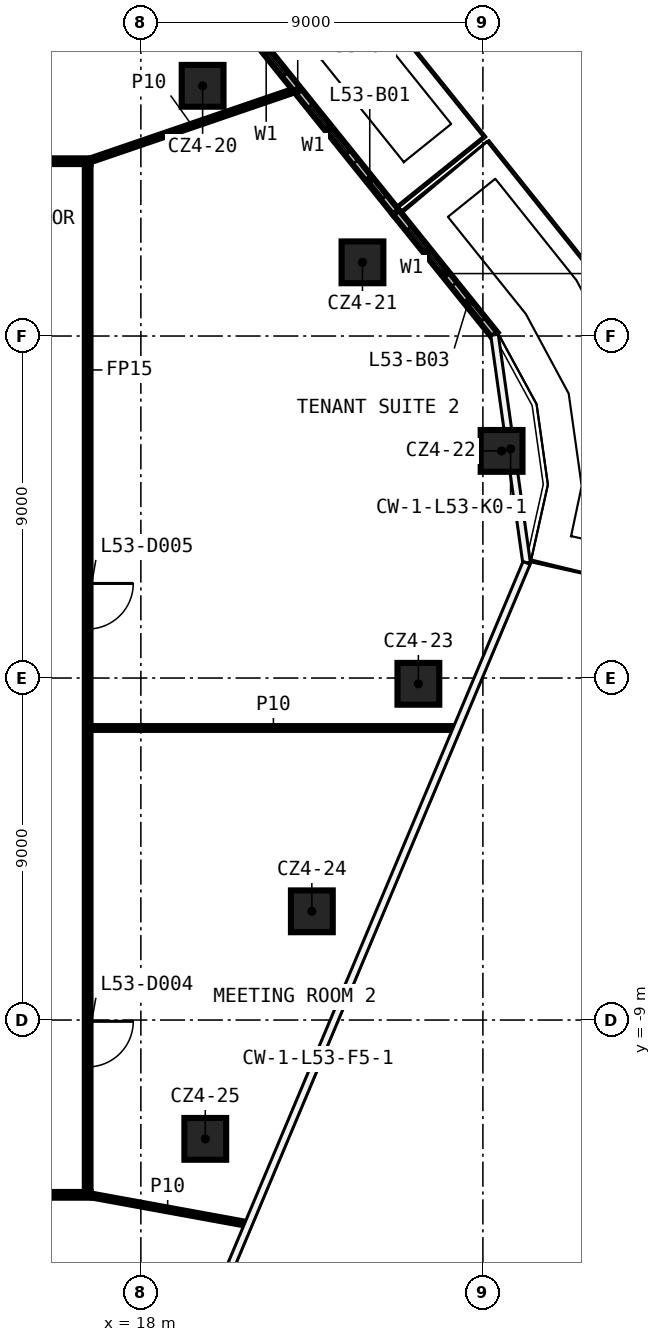
"""IFC4 building model, lengths in metres.
Left out: names, types, materials, properties, quantities, classifications, styles, units other than length and angle.
Written with IfcOpenShell. Run it as: python <this file> out.ifc"""

import sys

from ifc_helpers import new_model, si_unit, direction, frame, frame_2d, origin, origin_2d, place, context, subcontext, project, spatial, rectangle, extrude, element, fill, save


model = new_model("IFC4")
c1 = context("Model", 3, precision=1e-05, world=origin(), true_north=direction((0.0, 1.0)))
c2 = subcontext(c1, "Body", "Model", "MODEL_VIEW")
j1 = project(units=[si_unit("LENGTHUNIT", "METRE"), si_unit("PLANEANGLEUNIT", "RADIAN")], contexts=[c1])
p1 = place(None, origin())
s1 = spatial("IfcSite", under=j1, at=p1, CompositionType="ELEMENT")
p2 = place(p1, origin())
s2 = spatial("IfcBuilding", under=s1, at=p2, CompositionType="ELEMENT")
p3 = place(p2, frame((0.0, 0.0, 253.8)))
s3 = spatial("IfcBuildingStorey", under=s2, at=p3, CompositionType="ELEMENT", Elevation=253.8)
for number, where, z_axis, x_axis in (
    (1, (19.625, 15.584, 0.0), (0.0, 0.0, 1.0), (1.0, 0.0, 0.0)),
    (2, (23.831, 10.939, 0.0), (0.0, 0.0, 1.0), (1.0, 0.0, 0.0)),
    (3, (27.492, 5.977, 0.0), (0.0, 0.0, 1.0), (1.0, 0.0, 0.0)),
    (4, (25.302, -0.152, 0.0), (0.0, 0.0, 1.0), (1.0, 0.0, 0.0)),
    (5, (22.499, -6.139, 0.0), (0.0, 0.0, 1.0), (1.0, 0.0, 0.0)),
    (6, (19.695, -12.127, 0.0), (0.0, 0.0, 1.0), (1.0, 0.0, 0.0)),
):
    element("IfcColumn", number, at=place(p3, frame(where, z_axis=z_axis, x_axis=x_axis)), inside=s3, PredefinedType="COLUMN", context=c2, shape_type="SweptSolid", body=[
        extrude(rectangle(XDim=1.1, YDim=1.1, at=origin_2d()), origin(), (0.0, 0.0, 1.0), 3.82),
    ])
p4 = place(p3, frame((16.675, -13.6, 0.0), z_axis=(0.0, 0.0, 1.0), x_axis=(-1.0, 0.0, 0.0)))
e7 = element("IfcWall", 7, at=p4, inside=s3, PredefinedType="PARTITIONING", context=c2, shape_type="SweptSolid", body=[
    extrude(rectangle(XDim=32.75, YDim=0.15, at=frame_2d((16.375, 0.0))), origin(), (0.0, 0.0, 1.0), 3.82),
])
p5 = place(p4, frame((29.587, 0.0, 0.0)))
e8 = element("IfcOpeningElement", 8, at=p5, cuts=e7, PredefinedType="OPENING", context=c2, shape_type="SweptSolid", body=[
    extrude(rectangle(XDim=1.2, YDim=2.1, at=frame_2d((0.6, 1.05))), frame((0.0, 0.085, 0.0), z_axis=(0.0, -1.0, 0.0), x_axis=(1.0, 0.0, 0.0)), (0.0, 0.0, 1.0), 0.17),
])
p6 = place(p4, frame((17.04, 0.0, 0.0)))
e9 = element("IfcOpeningElement", 9, at=p6, cuts=e7, PredefinedType="OPENING", context=c2, shape_type="SweptSolid", body=[
    extrude(rectangle(XDim=1.2, YDim=2.1, at=frame_2d((0.6, 1.05))), frame((0.0, 0.085, 0.0), z_axis=(0.0, -1.0, 0.0), x_axis=(1.0, 0.0, 0.0)), (0.0, 0.0, 1.0), 0.17),
])
p7 = place(p4, frame((2.495, 0.0, 0.0)))
e10 = element("IfcOpeningElement", 10, at=p7, cuts=e7, PredefinedType="OPENING", context=c2, shape_type="SweptSolid", body=[
    extrude(rectangle(XDim=1.2, YDim=2.1, at=frame_2d((0.6, 1.05))), frame((0.0, 0.085, 0.0), z_axis=(0.0, -1.0, 0.0), x_axis=(1.0, 0.0, 0.0)), (0.0, 0.0, 1.0), 0.17),
])
p8 = place(p3, frame((16.675, -1.315, 0.0), z_axis=(0.0, 0.0, 1.0), x_axis=(1.0, 0.0, 0.0)))
e11 = element("IfcWall", 11, at=p8, inside=s3, PredefinedType="PARTITIONING", context=c2, shape_type="SweptSolid", body=[
    extrude(rectangle(XDim=9.626, YDim=0.1, at=frame_2d((4.813, 0.0))), origin(), (0.0, 0.0, 1.0), 3.82),
])
p9 = place(p3, frame((-16.075, 13.6, 0.0), z_axis=(0.0, 0.0, 1.0), x_axis=(1.0, 0.0, 0.0)))
e12 = element("IfcWall", 12, at=p9, inside=s3, PredefinedType="PARTITIONING", context=c2, shape_type="SweptSolid", body=[
    extrude(rectangle(XDim=32.75, YDim=0.15, at=frame_2d((16.375, 0.0))), origin(), (0.0, 0.0, 1.0), 3.82),
])
p10 = place(p9, frame((16.43, 0.0, 0.0)))
e13 = element("IfcOpeningElement", 13, at=p10, cuts=e12, PredefinedType="OPENING", context=c2, shape_type="SweptSolid", body=[
    extrude(rectangle(XDim=1.2, YDim=2.1, at=frame_2d((0.6, 1.05))), frame((0.0, 0.085, 0.0), z_axis=(0.0, -1.0, 0.0), x_axis=(1.0, 0.0, 0.0)), (0.0, 0.0, 1.0), 0.17),
])
p11 = place(p9, frame((4.465, 0.0, 0.0)))
e14 = element("IfcOpeningElement", 14, at=p11, cuts=e12, PredefinedType="OPENING", context=c2, shape_type="SweptSolid", body=[
    extrude(rectangle(XDim=1.2, YDim=2.1, at=frame_2d((0.6, 1.05))), frame((0.0, 0.085, 0.0), z_axis=(0.0, -1.0, 0.0), x_axis=(1.0, 0.0, 0.0)), (0.0, 0.0, 1.0), 0.17),
])
p12 = place(p3, frame((16.6, 13.6, 0.0), z_axis=(0.0, 0.0, 1.0), x_axis=(0.946142628781, 0.323750098073, 0.0)))
e15 = element("IfcWall", 15, at=p12, inside=s3, PredefinedType="PARTITIONING", context=c2, shape_type="SweptSolid", body=[
    extrude(rectangle(XDim=5.805, YDim=0.1, at=frame_2d((2.903, 0.0))), origin(), (0.0, 0.0, 1.0), 3.82),
])
p13 = place(p3, frame((16.6, 13.525, 0.0), z_axis=(0.0, 0.0, 1.0), x_axis=(0.0, -1.0, 0.0)))
e16 = element("IfcWall", 16, at=p13, inside=s3, PredefinedType="PARTITIONING", context=c2, shape_type="SweptSolid", body=[
    extrude(rectangle(XDim=27.05, YDim=0.15, at=frame_2d((13.525, 0.0))), origin(), (0.0, 0.0, 1.0), 3.82),
])
p14 = place(p13, frame((22.559, 0.0, 0.0)))
e17 = element("IfcOpeningElement", 17, at=p14, cuts=e16, PredefinedType="OPENING", context=c2, shape_type="SweptSolid", body=[
    extrude(rectangle(XDim=1.2, YDim=2.1, at=frame_2d((0.6, 1.05))), frame((0.0, 0.085, 0.0), z_axis=(0.0, -1.0, 0.0), x_axis=(1.0, 0.0, 0.0)), (0.0, 0.0, 1.0), 0.17),
])
p15 = place(p13, frame((11.036, 0.0, 0.0)))
e18 = element("IfcOpeningElement", 18, at=p15, cuts=e16, PredefinedType="OPENING", context=c2, shape_type="SweptSolid", body=[
    extrude(rectangle(XDim=1.2, YDim=2.1, at=frame_2d((0.6, 1.05))), frame((0.0, 0.085, 0.0), z_axis=(0.0, -1.0, 0.0), x_axis=(1.0, 0.0, 0.0)), (0.0, 0.0, 1.0), 0.17),
])
p16 = place(p3, frame((16.6, -13.6, 0.0), z_axis=(0.0, 0.0, 1.0), x_axis=(0.983699688502, -0.179819139254, 0.0)))
e19 = element("IfcWall", 19, at=p16, inside=s3, PredefinedType="PARTITIONING", context=c2, shape_type="SweptSolid", body=[
    extrude(rectangle(XDim=4.28, YDim=0.1, at=frame_2d((2.14, 0.0))), origin(), (0.0, 0.0, 1.0), 3.82),
])
p17 = place(p3, frame((24.712, 12.255, 0.0), z_axis=(0.0, 0.0, 1.0), x_axis=(-0.626871708653, 0.77912249415, 0.0)))
e20 = element("IfcWall", 20, at=p17, inside=s3, PredefinedType="SOLIDWALL", context=c2, shape_type="SweptSolid", body=[
    extrude(rectangle(XDim=8.293, YDim=0.2, at=frame_2d((4.147, 0.0))), origin(), (0.0, 0.0, 1.0), 3.82),
])
p18 = place(p17, frame((2.0, 0.0, 0.6)))
e21 = element("IfcOpeningElement", 21, at=p18, cuts=e20, PredefinedType="OPENING", context=c2, shape_type="SweptSolid", body=[
    extrude(rectangle(XDim=1.6, YDim=2.4, at=frame_2d((0.8, 1.2))), frame((0.0, 0.11, 0.0), z_axis=(0.0, -1.0, 0.0), x_axis=(1.0, 0.0, 0.0)), (0.0, 0.0, 1.0), 0.22),
])
p19 = place(p17, frame((0.5, 0.0, 0.0)))
e22 = element("IfcOpeningElement", 22, at=p19, cuts=e20, PredefinedType="OPENING", context=c2, shape_type="SweptSolid", body=[
    extrude(rectangle(XDim=1.2, YDim=2.4, at=frame_2d((0.6, 1.2))), frame((0.0, 0.11, 0.0), z_axis=(0.0, -1.0, 0.0), x_axis=(1.0, 0.0, 0.0)), (0.0, 0.0, 1.0), 0.22),
])
p20 = place(p17, frame((4.647, 0.0, 0.6)))
e23 = element("IfcOpeningElement", 23, at=p20, cuts=e20, PredefinedType="OPENING", context=c2, shape_type="SweptSolid", body=[
    extrude(rectangle(XDim=1.6, YDim=2.4, at=frame_2d((0.8, 1.2))), frame((0.0, 0.11, 0.0), z_axis=(0.0, -1.0, 0.0), x_axis=(1.0, 0.0, 0.0)), (0.0, 0.0, 1.0), 0.22),
])
p21 = place(p17, frame((6.547, 0.0, 0.0)))
e24 = element("IfcOpeningElement", 24, at=p21, cuts=e20, PredefinedType="OPENING", context=c2, shape_type="SweptSolid", body=[
    extrude(rectangle(XDim=1.2, YDim=2.4, at=frame_2d((0.6, 1.2))), frame((0.0, 0.11, 0.0), z_axis=(0.0, -1.0, 0.0), x_axis=(1.0, 0.0, 0.0)), (0.0, 0.0, 1.0), 0.22),
])
p22 = place(p3, frame((27.306, 9.031, 0.0), z_axis=(0.0, 0.0, 1.0), x_axis=(-0.626851318776, 0.779138899137, 0.0)))
e25 = element("IfcWall", 25, at=p22, inside=s3, PredefinedType="SOLIDWALL", context=c2, shape_type="SweptSolid", body=[
    extrude(rectangle(XDim=4.138, YDim=0.2, at=frame_2d((2.069, 0.0))), origin(), (0.0, 0.0, 1.0), 3.82),
])
p23 = place(p22, frame((2.0, 0.0, 0.6)))
e26 = element("IfcOpeningElement", 26, at=p23, cuts=e25, PredefinedType="OPENING", context=c2, shape_type="SweptSolid", body=[
    extrude(rectangle(XDim=1.6, YDim=2.4, at=frame_2d((0.8, 1.2))), frame((0.0, 0.11, 0.0), z_axis=(0.0, -1.0, 0.0), x_axis=(1.0, 0.0, 0.0)), (0.0, 0.0, 1.0), 0.22),
])
p24 = place(p22, frame((0.5, 0.0, 0.0)))
e27 = element("IfcOpeningElement", 27, at=p24, cuts=e25, PredefinedType="OPENING", context=c2, shape_type="SweptSolid", body=[
    extrude(rectangle(XDim=1.2, YDim=2.4, at=frame_2d((0.6, 1.2))), frame((0.0, 0.11, 0.0), z_axis=(0.0, -1.0, 0.0), x_axis=(1.0, 0.0, 0.0)), (0.0, 0.0, 1.0), 0.22),
])
p25 = place(p14, origin())
e28 = element("IfcDoor", 28, at=p25, inside=s3, OperationType="SINGLE_SWING_LEFT", PredefinedType="DOOR", context=c2, shape_type="SweptSolid", body=[
    extrude(rectangle(XDim=1.2, YDim=2.1, at=frame_2d((0.6, 1.05))), frame((0.0, 0.025, 0.0), z_axis=(0.0, -1.0, 0.0), x_axis=(1.0, 0.0, 0.0)), (0.0, 0.0, 1.0), 0.05),
])
fill(e17, e28)
p26 = place(p15, origin())
e29 = element("IfcDoor", 29, at=p26, inside=s3, OperationType="SINGLE_SWING_RIGHT", PredefinedType="DOOR", context=c2, shape_type="SweptSolid", body=[
    extrude(rectangle(XDim=1.2, YDim=2.1, at=frame_2d((0.6, 1.05))), frame((0.0, 0.025, 0.0), z_axis=(0.0, -1.0, 0.0), x_axis=(1.0, 0.0, 0.0)), (0.0, 0.0, 1.0), 0.05),
])
fill(e18, e29)
p27 = place(p18, origin())
e30 = element("IfcWindow", 30, at=p27, inside=s3, PartitioningType="SINGLE_PANEL", PredefinedType="WINDOW", context=c2, shape_type="SweptSolid", body=[
    extrude(rectangle(XDim=1.6, YDim=2.4, at=frame_2d((0.8, 1.2))), frame((0.0, 0.03, 0.0), z_axis=(0.0, -1.0, 0.0), x_axis=(1.0, 0.0, 0.0)), (0.0, 0.0, 1.0), 0.06),
])
fill(e21, e30)
p28 = place(p19, origin())
e31 = element("IfcDoor", 31, at=p28, inside=s3, OperationType="SLIDING_TO_LEFT", PredefinedType="DOOR", context=c2, shape_type="SweptSolid", body=[
    extrude(rectangle(XDim=1.2, YDim=2.4, at=frame_2d((0.6, 1.2))), frame((0.0, 0.025, 0.0), z_axis=(0.0, -1.0, 0.0), x_axis=(1.0, 0.0, 0.0)), (0.0, 0.0, 1.0), 0.05),
])
fill(e22, e31)
p29 = place(p20, origin())
e32 = element("IfcWindow", 32, at=p29, inside=s3, PartitioningType="SINGLE_PANEL", PredefinedType="WINDOW", context=c2, shape_type="SweptSolid", body=[
    extrude(rectangle(XDim=1.6, YDim=2.4, at=frame_2d((0.8, 1.2))), frame((0.0, 0.03, 0.0), z_axis=(0.0, -1.0, 0.0), x_axis=(1.0, 0.0, 0.0)), (0.0, 0.0, 1.0), 0.06),
])
fill(e23, e32)
p30 = place(p23, origin())
e33 = element("IfcWindow", 33, at=p30, inside=s3, PartitioningType="SINGLE_PANEL", PredefinedType="WINDOW", context=c2, shape_type="SweptSolid", body=[
    extrude(rectangle(XDim=1.6, YDim=2.4, at=frame_2d((0.8, 1.2))), frame((0.0, 0.03, 0.0), z_axis=(0.0, -1.0, 0.0), x_axis=(1.0, 0.0, 0.0)), (0.0, 0.0, 1.0), 0.06),
])
fill(e26, e33)
p31 = place(p24, origin())
e34 = element("IfcDoor", 34, at=p31, inside=s3, OperationType="SLIDING_TO_LEFT", PredefinedType="DOOR", context=c2, shape_type="SweptSolid", body=[
    extrude(rectangle(XDim=1.2, YDim=2.4, at=frame_2d((0.6, 1.2))), frame((0.0, 0.025, 0.0), z_axis=(0.0, -1.0, 0.0), x_axis=(1.0, 0.0, 0.0)), (0.0, 0.0, 1.0), 0.05),
])
fill(e27, e34)
save(model, sys.argv[1])
